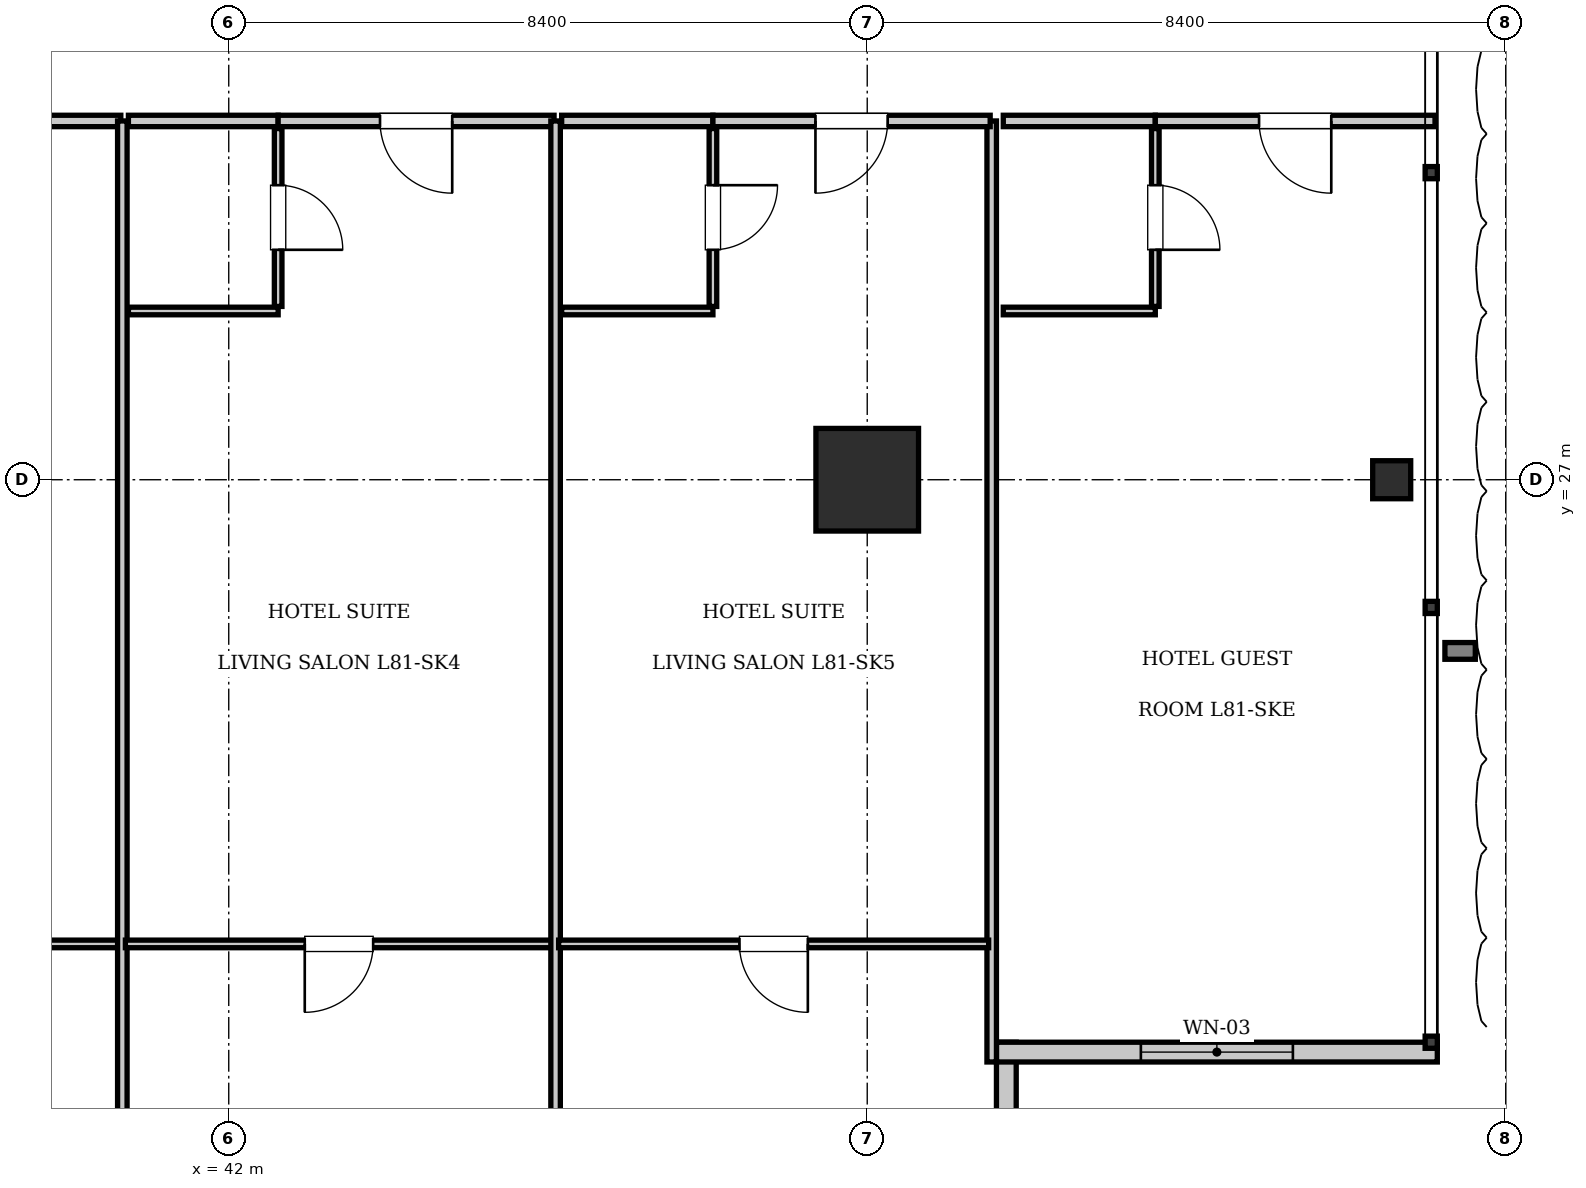
"""IFC4 building model, lengths in metres.
Left out: names, types, materials, properties, quantities, classifications, styles, units other than length and angle.
Written with IfcOpenShell. Run it as: python <this file> out.ifc"""

import sys

from ifc_helpers import new_model, si_unit, direction, frame, frame_2d, origin, origin_2d, place, context, subcontext, project, spatial, rectangle, i_section, extrude, element, fill, save


model = new_model("IFC4")
c1 = context("Model", 3, precision=1e-05, world=origin(), true_north=direction((0.0, 1.0)))
c2 = subcontext(c1, "Body", "Model", "MODEL_VIEW")
j1 = project(units=[si_unit("LENGTHUNIT", "METRE"), si_unit("PLANEANGLEUNIT", "RADIAN")], contexts=[c1])
p1 = place(None, origin())
s1 = spatial("IfcSite", under=j1, at=p1, CompositionType="ELEMENT")
p2 = place(p1, origin())
s2 = spatial("IfcBuilding", under=s1, at=p2, CompositionType="ELEMENT")
p3 = place(p2, frame((0.0, 0.0, 329.7)))
s3 = spatial("IfcBuildingStorey", under=s2, at=p3, CompositionType="ELEMENT", Elevation=329.7)
p4 = place(p3, frame((50.4, 27.0, 0.0), z_axis=(0.0, 0.0, 1.0), x_axis=(1.0, 0.0, 0.0)))
e1 = element("IfcColumn", 1, at=p4, inside=s3, PredefinedType="COLUMN", context=c2, shape_type="SweptSolid", body=[
    extrude(rectangle(XDim=1.35, YDim=1.35, at=origin_2d()), origin(), (0.0, 0.0, 1.0), 3.85),
])
p5 = place(p3, frame((57.3, 27.0, 0.0), z_axis=(0.0, 0.0, 1.0), x_axis=(1.0, 0.0, 0.0)))
e2 = element("IfcColumn", 2, at=p5, inside=s3, PredefinedType="COLUMN", context=c2, shape_type="SweptSolid", body=[
    extrude(i_section(OverallWidth=0.5, OverallDepth=0.5, WebThickness=0.022, FlangeThickness=0.032, at=origin_2d()), origin(), (0.0, 0.0, 1.0), 3.85),
])
p6 = place(p3, frame((52.23, 19.6, 0.0), z_axis=(0.0, 0.0, 1.0), x_axis=(0.0, -1.0, 0.0)))
e3 = element("IfcWall", 3, at=p6, inside=s3, PredefinedType="SOLIDWALL", context=c2, shape_type="SweptSolid", body=[
    extrude(rectangle(XDim=5.8, YDim=0.26, at=frame_2d((2.9, 0.0))), origin(), (0.0, 0.0, 1.0), 3.61),
])
p7 = place(p3, frame((57.9, 19.47, 0.0), z_axis=(0.0, 0.0, 1.0), x_axis=(-1.0, 0.0, 0.0)))
e4 = element("IfcWall", 4, at=p7, inside=s3, PredefinedType="SOLIDWALL", context=c2, shape_type="SweptSolid", body=[
    extrude(rectangle(XDim=5.8, YDim=0.26, at=frame_2d((2.9, 0.0))), origin(), (0.0, 0.0, 1.0), 3.61),
])
p8 = place(p7, frame((1.9, 0.0, 0.9)))
e5 = element("IfcOpeningElement", 5, at=p8, cuts=e4, PredefinedType="OPENING", context=c2, shape_type="SweptSolid", body=[
    extrude(rectangle(XDim=2.0, YDim=2.2, at=frame_2d((1.0, 1.1))), frame((0.0, 0.14, 0.0), z_axis=(0.0, -1.0, 0.0), x_axis=(1.0, 0.0, 0.0)), (0.0, 0.0, 1.0), 0.28),
])
p9 = place(p3, frame((52.038, 19.34, 0.0), z_axis=(0.0, 0.0, 1.0), x_axis=(0.0, 1.0, 0.0)))
e6 = element("IfcWall", 6, at=p9, inside=s3, PredefinedType="PARTITIONING", context=c2, shape_type="SweptSolid", body=[
    extrude(rectangle(XDim=12.38, YDim=0.125, at=frame_2d((6.19, 0.0))), origin(), (0.0, 0.0, 1.0), 3.61),
])
p10 = place(p3, frame((37.02, 31.72, 0.0), z_axis=(0.0, 0.0, 1.0), x_axis=(1.0, 0.0, 0.0)))
e7 = element("IfcWall", 7, at=p10, inside=s3, PredefinedType="PARTITIONING", context=c2, shape_type="SweptSolid", body=[
    extrude(rectangle(XDim=3.56, YDim=0.15, at=frame_2d((1.78, 0.0))), origin(), (0.0, 0.0, 1.0), 3.61),
])
p11 = place(p10, frame((1.305, 0.0, 0.0)))
e8 = element("IfcOpeningElement", 8, at=p11, cuts=e7, PredefinedType="OPENING", context=c2, shape_type="SweptSolid", body=[
    extrude(rectangle(XDim=0.95, YDim=2.15, at=frame_2d((0.475, 1.075))), frame((0.0, 0.085, 0.0), z_axis=(0.0, -1.0, 0.0), x_axis=(1.0, 0.0, 0.0)), (0.0, 0.0, 1.0), 0.17),
])
p12 = place(p3, frame((35.04, 20.893, 0.0), z_axis=(0.0, 0.0, 1.0), x_axis=(1.0, 0.0, 0.0)))
e9 = element("IfcWall", 9, at=p12, inside=s3, PredefinedType="PARTITIONING", context=c2, shape_type="SweptSolid", body=[
    extrude(rectangle(XDim=5.52, YDim=0.1, at=frame_2d((2.76, 0.0))), origin(), (0.0, 0.0, 1.0), 3.61),
])
p13 = place(p12, frame((2.31, 0.0, 0.0)))
e10 = element("IfcOpeningElement", 10, at=p13, cuts=e9, PredefinedType="OPENING", context=c2, shape_type="SweptSolid", body=[
    extrude(rectangle(XDim=0.9, YDim=2.1, at=frame_2d((0.45, 1.05))), frame((0.0, 0.06, 0.0), z_axis=(0.0, -1.0, 0.0), x_axis=(1.0, 0.0, 0.0)), (0.0, 0.0, 1.0), 0.12),
])
p14 = place(p3, frame((40.6, 13.9, 0.0), z_axis=(0.0, 0.0, 1.0), x_axis=(0.0, 1.0, 0.0)))
e11 = element("IfcWall", 11, at=p14, inside=s3, PredefinedType="PARTITIONING", context=c2, shape_type="SweptSolid", body=[
    extrude(rectangle(XDim=17.82, YDim=0.125, at=frame_2d((8.91, 0.0))), origin(), (0.0, 0.0, 1.0), 3.61),
])
p15 = place(p3, frame((40.68, 31.72, 0.0), z_axis=(0.0, 0.0, 1.0), x_axis=(1.0, 0.0, 0.0)))
e12 = element("IfcWall", 12, at=p15, inside=s3, PredefinedType="PARTITIONING", context=c2, shape_type="SweptSolid", body=[
    extrude(rectangle(XDim=1.97, YDim=0.15, at=frame_2d((0.985, 0.0))), origin(), (0.0, 0.0, 1.0), 3.61),
])
p16 = place(p3, frame((40.68, 29.22, 0.0), z_axis=(0.0, 0.0, 1.0), x_axis=(1.0, 0.0, 0.0)))
e13 = element("IfcWall", 13, at=p16, inside=s3, PredefinedType="PARTITIONING", context=c2, shape_type="SweptSolid", body=[
    extrude(rectangle(XDim=1.97, YDim=0.1, at=frame_2d((0.985, 0.0))), origin(), (0.0, 0.0, 1.0), 3.61),
])
p17 = place(p3, frame((42.65, 29.28, 0.0), z_axis=(0.0, 0.0, 1.0), x_axis=(0.0, 1.0, 0.0)))
e14 = element("IfcWall", 14, at=p17, inside=s3, PredefinedType="PARTITIONING", context=c2, shape_type="SweptSolid", body=[
    extrude(rectangle(XDim=2.34, YDim=0.1, at=frame_2d((1.17, 0.0))), origin(), (0.0, 0.0, 1.0), 3.61),
])
p18 = place(p17, frame((0.745, 0.0, 0.0)))
e15 = element("IfcOpeningElement", 15, at=p18, cuts=e14, PredefinedType="OPENING", context=c2, shape_type="SweptSolid", body=[
    extrude(rectangle(XDim=0.85, YDim=2.1, at=frame_2d((0.425, 1.05))), frame((0.0, 0.06, 0.0), z_axis=(0.0, -1.0, 0.0), x_axis=(1.0, 0.0, 0.0)), (0.0, 0.0, 1.0), 0.12),
])
p19 = place(p3, frame((42.65, 31.72, 0.0), z_axis=(0.0, 0.0, 1.0), x_axis=(1.0, 0.0, 0.0)))
e16 = element("IfcWall", 16, at=p19, inside=s3, PredefinedType="PARTITIONING", context=c2, shape_type="SweptSolid", body=[
    extrude(rectangle(XDim=3.63, YDim=0.15, at=frame_2d((1.815, 0.0))), origin(), (0.0, 0.0, 1.0), 3.61),
])
p20 = place(p19, frame((1.34, 0.0, 0.0)))
e17 = element("IfcOpeningElement", 17, at=p20, cuts=e16, PredefinedType="OPENING", context=c2, shape_type="SweptSolid", body=[
    extrude(rectangle(XDim=0.95, YDim=2.15, at=frame_2d((0.475, 1.075))), frame((0.0, 0.085, 0.0), z_axis=(0.0, -1.0, 0.0), x_axis=(1.0, 0.0, 0.0)), (0.0, 0.0, 1.0), 0.17),
])
p21 = place(p3, frame((40.64, 20.893, 0.0), z_axis=(0.0, 0.0, 1.0), x_axis=(1.0, 0.0, 0.0)))
e18 = element("IfcWall", 18, at=p21, inside=s3, PredefinedType="PARTITIONING", context=c2, shape_type="SweptSolid", body=[
    extrude(rectangle(XDim=5.62, YDim=0.1, at=frame_2d((2.81, 0.0))), origin(), (0.0, 0.0, 1.0), 3.61),
])
p22 = place(p21, frame((2.36, 0.0, 0.0)))
e19 = element("IfcOpeningElement", 19, at=p22, cuts=e18, PredefinedType="OPENING", context=c2, shape_type="SweptSolid", body=[
    extrude(rectangle(XDim=0.9, YDim=2.1, at=frame_2d((0.45, 1.05))), frame((0.0, 0.06, 0.0), z_axis=(0.0, -1.0, 0.0), x_axis=(1.0, 0.0, 0.0)), (0.0, 0.0, 1.0), 0.12),
])
p23 = place(p3, frame((46.3, 13.9, 0.0), z_axis=(0.0, 0.0, 1.0), x_axis=(0.0, 1.0, 0.0)))
e20 = element("IfcWall", 20, at=p23, inside=s3, PredefinedType="PARTITIONING", context=c2, shape_type="SweptSolid", body=[
    extrude(rectangle(XDim=17.82, YDim=0.125, at=frame_2d((8.91, 0.0))), origin(), (0.0, 0.0, 1.0), 3.352),
])
p24 = place(p3, frame((46.38, 31.72, 0.0), z_axis=(0.0, 0.0, 1.0), x_axis=(1.0, 0.0, 0.0)))
e21 = element("IfcWall", 21, at=p24, inside=s3, PredefinedType="PARTITIONING", context=c2, shape_type="SweptSolid", body=[
    extrude(rectangle(XDim=1.99, YDim=0.15, at=frame_2d((0.995, 0.0))), origin(), (0.0, 0.0, 1.0), 3.61),
])
p25 = place(p3, frame((46.38, 29.22, 0.0), z_axis=(0.0, 0.0, 1.0), x_axis=(1.0, 0.0, 0.0)))
e22 = element("IfcWall", 22, at=p25, inside=s3, PredefinedType="PARTITIONING", context=c2, shape_type="SweptSolid", body=[
    extrude(rectangle(XDim=1.99, YDim=0.1, at=frame_2d((0.995, 0.0))), origin(), (0.0, 0.0, 1.0), 3.61),
])
p26 = place(p3, frame((48.37, 29.28, 0.0), z_axis=(0.0, 0.0, 1.0), x_axis=(0.0, 1.0, 0.0)))
e23 = element("IfcWall", 23, at=p26, inside=s3, PredefinedType="PARTITIONING", context=c2, shape_type="SweptSolid", body=[
    extrude(rectangle(XDim=2.34, YDim=0.1, at=frame_2d((1.17, 0.0))), origin(), (0.0, 0.0, 1.0), 3.61),
])
p27 = place(p26, frame((0.745, 0.0, 0.0)))
e24 = element("IfcOpeningElement", 24, at=p27, cuts=e23, PredefinedType="OPENING", context=c2, shape_type="SweptSolid", body=[
    extrude(rectangle(XDim=0.85, YDim=2.1, at=frame_2d((0.425, 1.05))), frame((0.0, 0.06, 0.0), z_axis=(0.0, -1.0, 0.0), x_axis=(1.0, 0.0, 0.0)), (0.0, 0.0, 1.0), 0.12),
])
p28 = place(p3, frame((48.37, 31.72, 0.0), z_axis=(0.0, 0.0, 1.0), x_axis=(1.0, 0.0, 0.0)))
e25 = element("IfcWall", 25, at=p28, inside=s3, PredefinedType="PARTITIONING", context=c2, shape_type="SweptSolid", body=[
    extrude(rectangle(XDim=3.647, YDim=0.15, at=frame_2d((1.824, 0.0))), origin(), (0.0, 0.0, 1.0), 3.61),
])
p29 = place(p28, frame((1.349, 0.0, 0.0)))
e26 = element("IfcOpeningElement", 26, at=p29, cuts=e25, PredefinedType="OPENING", context=c2, shape_type="SweptSolid", body=[
    extrude(rectangle(XDim=0.95, YDim=2.15, at=frame_2d((0.475, 1.075))), frame((0.0, 0.085, 0.0), z_axis=(0.0, -1.0, 0.0), x_axis=(1.0, 0.0, 0.0)), (0.0, 0.0, 1.0), 0.17),
])
p30 = place(p3, frame((46.34, 20.893, 0.0), z_axis=(0.0, 0.0, 1.0), x_axis=(1.0, 0.0, 0.0)))
e27 = element("IfcWall", 27, at=p30, inside=s3, PredefinedType="PARTITIONING", context=c2, shape_type="SweptSolid", body=[
    extrude(rectangle(XDim=5.657, YDim=0.1, at=frame_2d((2.829, 0.0))), origin(), (0.0, 0.0, 1.0), 3.61),
])
p31 = place(p30, frame((2.379, 0.0, 0.0)))
e28 = element("IfcOpeningElement", 28, at=p31, cuts=e27, PredefinedType="OPENING", context=c2, shape_type="SweptSolid", body=[
    extrude(rectangle(XDim=0.9, YDim=2.1, at=frame_2d((0.45, 1.05))), frame((0.0, 0.06, 0.0), z_axis=(0.0, -1.0, 0.0), x_axis=(1.0, 0.0, 0.0)), (0.0, 0.0, 1.0), 0.12),
])
p32 = place(p3, frame((52.19, 31.72, 0.0), z_axis=(0.0, 0.0, 1.0), x_axis=(1.0, 0.0, 0.0)))
e29 = element("IfcWall", 29, at=p32, inside=s3, PredefinedType="PARTITIONING", context=c2, shape_type="SweptSolid", body=[
    extrude(rectangle(XDim=2.0, YDim=0.15, at=frame_2d((1.0, 0.0))), origin(), (0.0, 0.0, 1.0), 3.61),
])
p33 = place(p3, frame((52.19, 29.22, 0.0), z_axis=(0.0, 0.0, 1.0), x_axis=(1.0, 0.0, 0.0)))
e30 = element("IfcWall", 30, at=p33, inside=s3, PredefinedType="PARTITIONING", context=c2, shape_type="SweptSolid", body=[
    extrude(rectangle(XDim=2.0, YDim=0.1, at=frame_2d((1.0, 0.0))), origin(), (0.0, 0.0, 1.0), 3.61),
])
p34 = place(p3, frame((54.19, 29.28, 0.0), z_axis=(0.0, 0.0, 1.0), x_axis=(0.0, 1.0, 0.0)))
e31 = element("IfcWall", 31, at=p34, inside=s3, PredefinedType="PARTITIONING", context=c2, shape_type="SweptSolid", body=[
    extrude(rectangle(XDim=2.34, YDim=0.1, at=frame_2d((1.17, 0.0))), origin(), (0.0, 0.0, 1.0), 3.61),
])
p35 = place(p34, frame((0.745, 0.0, 0.0)))
e32 = element("IfcOpeningElement", 32, at=p35, cuts=e31, PredefinedType="OPENING", context=c2, shape_type="SweptSolid", body=[
    extrude(rectangle(XDim=0.85, YDim=2.1, at=frame_2d((0.425, 1.05))), frame((0.0, 0.06, 0.0), z_axis=(0.0, -1.0, 0.0), x_axis=(1.0, 0.0, 0.0)), (0.0, 0.0, 1.0), 0.12),
])
p36 = place(p3, frame((54.19, 31.72, 0.0), z_axis=(0.0, 0.0, 1.0), x_axis=(1.0, 0.0, 0.0)))
e33 = element("IfcWall", 33, at=p36, inside=s3, PredefinedType="PARTITIONING", context=c2, shape_type="SweptSolid", body=[
    extrude(rectangle(XDim=3.68, YDim=0.15, at=frame_2d((1.84, 0.0))), origin(), (0.0, 0.0, 1.0), 3.61),
])
p37 = place(p36, frame((1.365, 0.0, 0.0)))
e34 = element("IfcOpeningElement", 34, at=p37, cuts=e33, PredefinedType="OPENING", context=c2, shape_type="SweptSolid", body=[
    extrude(rectangle(XDim=0.95, YDim=2.15, at=frame_2d((0.475, 1.075))), frame((0.0, 0.085, 0.0), z_axis=(0.0, -1.0, 0.0), x_axis=(1.0, 0.0, 0.0)), (0.0, 0.0, 1.0), 0.17),
])
p38 = place(p8, origin())
e35 = element("IfcWindow", 35, at=p38, inside=s3, PartitioningType="SINGLE_PANEL", PredefinedType="WINDOW", context=c2, shape_type="SweptSolid", body=[
    extrude(rectangle(XDim=2.0, YDim=2.2, at=frame_2d((1.0, 1.1))), frame((0.0, 0.03, 0.0), z_axis=(0.0, -1.0, 0.0), x_axis=(1.0, 0.0, 0.0)), (0.0, 0.0, 1.0), 0.06),
])
fill(e5, e35)
p39 = place(p18, frame((0.85, 0.0, 0.0), z_axis=(0.0, 0.0, 1.0), x_axis=(-1.0, 0.0, 0.0)))
e36 = element("IfcDoor", 36, at=p39, inside=s3, OperationType="SINGLE_SWING_RIGHT", PredefinedType="DOOR", context=c2, shape_type="SweptSolid", body=[
    extrude(rectangle(XDim=0.85, YDim=2.1, at=frame_2d((0.425, 1.05))), frame((0.0, 0.025, 0.0), z_axis=(0.0, -1.0, 0.0), x_axis=(1.0, 0.0, 0.0)), (0.0, 0.0, 1.0), 0.05),
])
fill(e15, e36)
p40 = place(p20, frame((0.95, 0.0, 0.0), z_axis=(0.0, 0.0, 1.0), x_axis=(-1.0, 0.0, 0.0)))
e37 = element("IfcDoor", 37, at=p40, inside=s3, OperationType="SINGLE_SWING_LEFT", PredefinedType="DOOR", context=c2, shape_type="SweptSolid", body=[
    extrude(rectangle(XDim=0.95, YDim=2.15, at=frame_2d((0.475, 1.075))), frame((0.0, 0.025, 0.0), z_axis=(0.0, -1.0, 0.0), x_axis=(1.0, 0.0, 0.0)), (0.0, 0.0, 1.0), 0.05),
])
fill(e17, e37)
p41 = place(p22, frame((0.9, 0.0, 0.0), z_axis=(0.0, 0.0, 1.0), x_axis=(-1.0, 0.0, 0.0)))
e38 = element("IfcDoor", 38, at=p41, inside=s3, OperationType="SINGLE_SWING_RIGHT", PredefinedType="DOOR", context=c2, shape_type="SweptSolid", body=[
    extrude(rectangle(XDim=0.9, YDim=2.1, at=frame_2d((0.45, 1.05))), frame((0.0, 0.025, 0.0), z_axis=(0.0, -1.0, 0.0), x_axis=(1.0, 0.0, 0.0)), (0.0, 0.0, 1.0), 0.05),
])
fill(e19, e38)
p42 = place(p27, frame((0.85, 0.0, 0.0), z_axis=(0.0, 0.0, 1.0), x_axis=(-1.0, 0.0, 0.0)))
e39 = element("IfcDoor", 39, at=p42, inside=s3, OperationType="SINGLE_SWING_LEFT", PredefinedType="DOOR", context=c2, shape_type="SweptSolid", body=[
    extrude(rectangle(XDim=0.85, YDim=2.1, at=frame_2d((0.425, 1.05))), frame((0.0, 0.025, 0.0), z_axis=(0.0, -1.0, 0.0), x_axis=(1.0, 0.0, 0.0)), (0.0, 0.0, 1.0), 0.05),
])
fill(e24, e39)
p43 = place(p29, frame((0.95, 0.0, 0.0), z_axis=(0.0, 0.0, 1.0), x_axis=(-1.0, 0.0, 0.0)))
e40 = element("IfcDoor", 40, at=p43, inside=s3, OperationType="SINGLE_SWING_RIGHT", PredefinedType="DOOR", context=c2, shape_type="SweptSolid", body=[
    extrude(rectangle(XDim=0.95, YDim=2.15, at=frame_2d((0.475, 1.075))), frame((0.0, 0.025, 0.0), z_axis=(0.0, -1.0, 0.0), x_axis=(1.0, 0.0, 0.0)), (0.0, 0.0, 1.0), 0.05),
])
fill(e26, e40)
p44 = place(p31, frame((0.9, 0.0, 0.0), z_axis=(0.0, 0.0, 1.0), x_axis=(-1.0, 0.0, 0.0)))
e41 = element("IfcDoor", 41, at=p44, inside=s3, OperationType="SINGLE_SWING_LEFT", PredefinedType="DOOR", context=c2, shape_type="SweptSolid", body=[
    extrude(rectangle(XDim=0.9, YDim=2.1, at=frame_2d((0.45, 1.05))), frame((0.0, 0.025, 0.0), z_axis=(0.0, -1.0, 0.0), x_axis=(1.0, 0.0, 0.0)), (0.0, 0.0, 1.0), 0.05),
])
fill(e28, e41)
p45 = place(p35, frame((0.85, 0.0, 0.0), z_axis=(0.0, 0.0, 1.0), x_axis=(-1.0, 0.0, 0.0)))
e42 = element("IfcDoor", 42, at=p45, inside=s3, OperationType="SINGLE_SWING_RIGHT", PredefinedType="DOOR", context=c2, shape_type="SweptSolid", body=[
    extrude(rectangle(XDim=0.85, YDim=2.1, at=frame_2d((0.425, 1.05))), frame((0.0, 0.025, 0.0), z_axis=(0.0, -1.0, 0.0), x_axis=(1.0, 0.0, 0.0)), (0.0, 0.0, 1.0), 0.05),
])
fill(e32, e42)
p46 = place(p37, frame((0.95, 0.0, 0.0), z_axis=(0.0, 0.0, 1.0), x_axis=(-1.0, 0.0, 0.0)))
e43 = element("IfcDoor", 43, at=p46, inside=s3, OperationType="SINGLE_SWING_LEFT", PredefinedType="DOOR", context=c2, shape_type="SweptSolid", body=[
    extrude(rectangle(XDim=0.95, YDim=2.15, at=frame_2d((0.475, 1.075))), frame((0.0, 0.025, 0.0), z_axis=(0.0, -1.0, 0.0), x_axis=(1.0, 0.0, 0.0)), (0.0, 0.0, 1.0), 0.05),
])
fill(e34, e43)
save(model, sys.argv[1])
